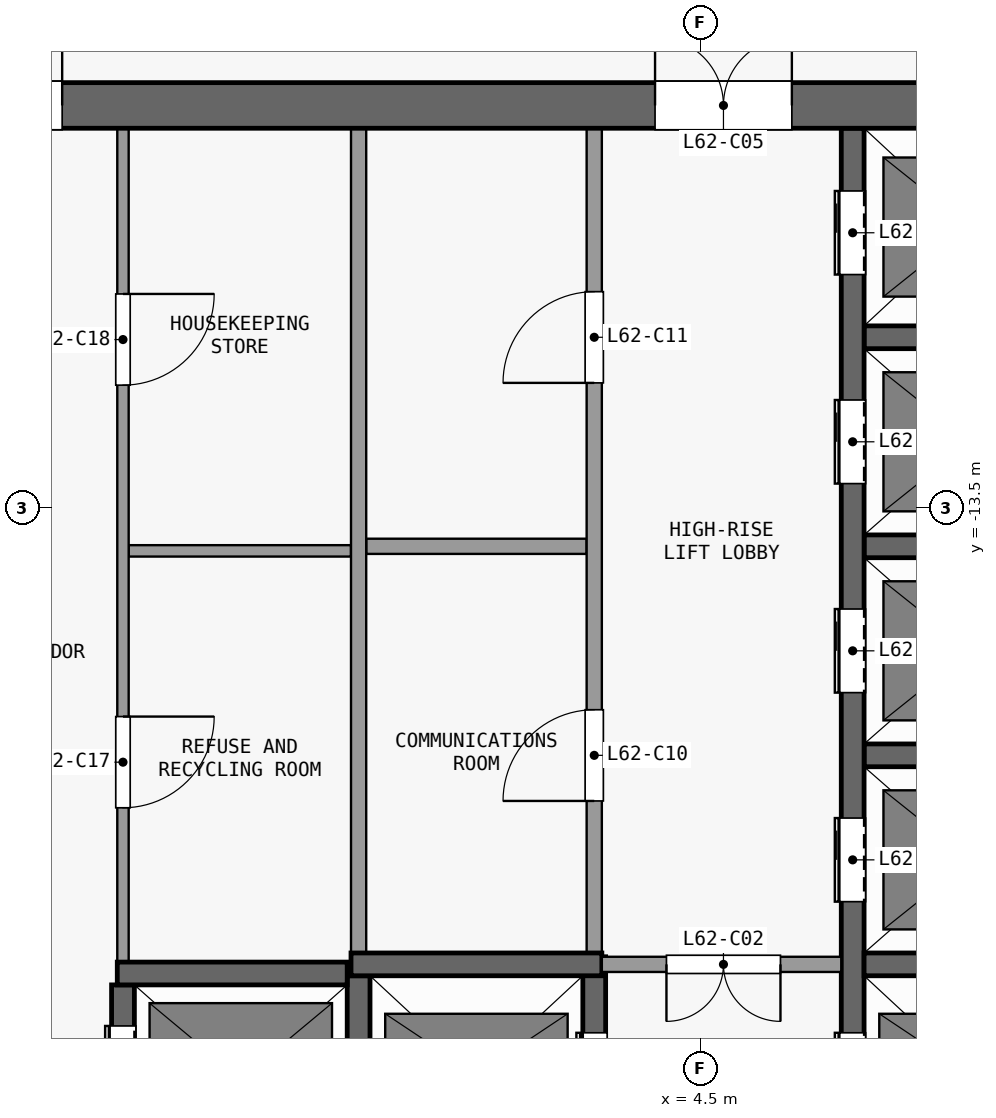
"""IFC4 building model, lengths in metres.
Left out: names, types, materials, properties, quantities, classifications, styles, units other than length and angle.
Written with IfcOpenShell. Run it as: python <this file> out.ifc"""

import sys

from ifc_helpers import new_model, si_unit, direction, frame, frame_2d, origin, place, context, subcontext, project, spatial, rectangle, extrude, element, fill, save


model = new_model("IFC4")
c1 = context("Model", 3, precision=1e-05, world=origin(), true_north=direction((0.0, 1.0)))
c2 = subcontext(c1, "Body", "Model", "MODEL_VIEW")
j1 = project(units=[si_unit("LENGTHUNIT", "METRE"), si_unit("PLANEANGLEUNIT", "RADIAN")], contexts=[c1])
p1 = place(None, origin())
s1 = spatial("IfcSite", under=j1, at=p1, CompositionType="ELEMENT")
p2 = place(p1, origin())
s2 = spatial("IfcBuilding", under=s1, at=p2, CompositionType="ELEMENT")
p3 = place(p2, frame((0.0, 0.0, 244.7)))
s3 = spatial("IfcBuildingStorey", under=s2, at=p3, CompositionType="ELEMENT", Elevation=244.7)
p4 = place(p3, frame((-13.2, -8.2, 0.0), z_axis=(0.0, 0.0, 1.0), x_axis=(1.0, 0.0, 0.0)))
e1 = element("IfcWall", 1, at=p4, inside=s3, PredefinedType="SHEAR", context=c2, shape_type="SweptSolid", body=[
    extrude(rectangle(XDim=26.4, YDim=0.6, at=frame_2d((13.2, 0.0))), origin(), (0.0, 0.0, 1.0), 3.15),
])
p5 = place(p4, frame((7.5, 0.0, 0.0)))
e2 = element("IfcOpeningElement", 2, at=p5, cuts=e1, PredefinedType="OPENING", context=c2, shape_type="SweptSolid", body=[
    extrude(rectangle(XDim=1.8, YDim=2.1, at=frame_2d((0.9, 1.05))), frame((0.0, 0.31, 0.0), z_axis=(0.0, -1.0, 0.0), x_axis=(1.0, 0.0, 0.0)), (0.0, 0.0, 1.0), 0.62),
])
p6 = place(p4, frame((17.1, 0.0, 0.0)))
e3 = element("IfcOpeningElement", 3, at=p6, cuts=e1, PredefinedType="OPENING", context=c2, shape_type="SweptSolid", body=[
    extrude(rectangle(XDim=1.8, YDim=2.1, at=frame_2d((0.9, 1.05))), frame((0.0, 0.31, 0.0), z_axis=(0.0, -1.0, 0.0), x_axis=(1.0, 0.0, 0.0)), (0.0, 0.0, 1.0), 0.62),
])
p7 = place(p4, frame((2.425, 0.0, 0.0)))
e4 = element("IfcOpeningElement", 4, at=p7, cuts=e1, PredefinedType="OPENING", context=c2, shape_type="SweptSolid", body=[
    extrude(rectangle(XDim=0.9, YDim=2.1, at=frame_2d((0.45, 1.05))), frame((0.0, 0.31, 0.0), z_axis=(0.0, -1.0, 0.0), x_axis=(1.0, 0.0, 0.0)), (0.0, 0.0, 1.0), 0.62),
])
p8 = place(p4, frame((23.075, 0.0, 0.0)))
e5 = element("IfcOpeningElement", 5, at=p8, cuts=e1, PredefinedType="OPENING", context=c2, shape_type="SweptSolid", body=[
    extrude(rectangle(XDim=0.9, YDim=2.1, at=frame_2d((0.45, 1.05))), frame((0.0, 0.31, 0.0), z_axis=(0.0, -1.0, 0.0), x_axis=(1.0, 0.0, 0.0)), (0.0, 0.0, 1.0), 0.62),
])
p9 = place(p3, frame((-3.175, -19.62, 0.0), z_axis=(0.0, 0.0, 1.0), x_axis=(1.0, 0.0, 0.0)))
e6 = element("IfcWall", 6, at=p9, inside=s3, PredefinedType="SHEAR", context=c2, shape_type="SweptSolid", body=[
    extrude(rectangle(XDim=3.025, YDim=0.3, at=frame_2d((1.513, 0.0))), origin(), (0.0, 0.0, 1.0), 3.15),
])
p10 = place(p3, frame((-0.1, -19.5, 0.0), z_axis=(0.0, 0.0, 1.0), x_axis=(1.0, 0.0, 0.0)))
e7 = element("IfcWall", 7, at=p10, inside=s3, PredefinedType="SHEAR", context=c2, shape_type="SweptSolid", body=[
    extrude(rectangle(XDim=3.3, YDim=0.3, at=frame_2d((1.65, 0.0))), origin(), (0.0, 0.0, 1.0), 3.15),
])
p11 = place(p3, frame((6.35, -19.5, 0.0), z_axis=(0.0, 0.0, 1.0), x_axis=(-1.0, 0.0, 0.0)))
e8 = element("IfcWall", 8, at=p11, inside=s3, PredefinedType="PARTITIONING", context=c2, shape_type="SweptSolid", body=[
    extrude(rectangle(XDim=3.15, YDim=0.2, at=frame_2d((1.575, 0.0))), origin(), (0.0, 0.0, 1.0), 3.15),
])
p12 = place(p11, frame((0.8, 0.0, 0.0)))
e9 = element("IfcOpeningElement", 9, at=p12, cuts=e8, PredefinedType="OPENING", context=c2, shape_type="SweptSolid", body=[
    extrude(rectangle(XDim=1.5, YDim=2.1, at=frame_2d((0.75, 1.05))), frame((0.0, 0.11, 0.0), z_axis=(0.0, -1.0, 0.0), x_axis=(1.0, 0.0, 0.0)), (0.0, 0.0, 1.0), 0.22),
])
for number, where, z_axis, x_axis in (
    (10, (6.65, -19.5, 0.0), (0.0, 0.0, 1.0), (1.0, 0.0, 0.0)),
    (11, (6.65, -16.75, 0.0), (0.0, 0.0, 1.0), (1.0, 0.0, 0.0)),
):
    element("IfcWall", number, at=place(p3, frame(where, z_axis=z_axis, x_axis=x_axis)), inside=s3, PredefinedType="SHEAR", context=c2, shape_type="SweptSolid", body=[
        extrude(rectangle(XDim=2.8, YDim=0.3, at=frame_2d((1.4, 0.0))), origin(), (0.0, 0.0, 1.0), 3.15),
    ])
p13 = place(p3, frame((-3.025, -14.06, 0.0), z_axis=(0.0, 0.0, 1.0), x_axis=(1.0, 0.0, 0.0)))
e12 = element("IfcWall", 12, at=p13, inside=s3, PredefinedType="PARTITIONING", context=c2, shape_type="SweptSolid", body=[
    extrude(rectangle(XDim=2.925, YDim=0.15, at=frame_2d((1.462, 0.0))), origin(), (0.0, 0.0, 1.0), 3.15),
])
p14 = place(p3, frame((0.1, -14.0, 0.0), z_axis=(0.0, 0.0, 1.0), x_axis=(1.0, 0.0, 0.0)))
e13 = element("IfcWall", 13, at=p14, inside=s3, PredefinedType="PARTITIONING", context=c2, shape_type="SweptSolid", body=[
    extrude(rectangle(XDim=2.9, YDim=0.2, at=frame_2d((1.45, 0.0))), origin(), (0.0, 0.0, 1.0), 3.15),
])
for number, where, z_axis, x_axis in (
    (14, (6.65, -14.0, 0.0), (0.0, 0.0, 1.0), (1.0, 0.0, 0.0)),
    (15, (6.65, -11.25, 0.0), (0.0, 0.0, 1.0), (1.0, 0.0, 0.0)),
):
    element("IfcWall", number, at=place(p3, frame(where, z_axis=z_axis, x_axis=x_axis)), inside=s3, PredefinedType="SHEAR", context=c2, shape_type="SweptSolid", body=[
        extrude(rectangle(XDim=2.8, YDim=0.3, at=frame_2d((1.4, 0.0))), origin(), (0.0, 0.0, 1.0), 3.15),
    ])
p15 = place(p3, frame((-3.1, -22.25, 0.0), z_axis=(0.0, 0.0, 1.0), x_axis=(0.0, 1.0, 0.0)))
e16 = element("IfcWall", 16, at=p15, inside=s3, PredefinedType="SHEAR", context=c2, shape_type="SweptSolid", body=[
    extrude(rectangle(XDim=2.48, YDim=0.3, at=frame_2d((1.24, 0.0))), origin(), (0.0, 0.0, 1.0), 3.15),
])
p16 = place(p15, frame((0.54, 0.0, 0.0)))
e17 = element("IfcOpeningElement", 17, at=p16, cuts=e16, PredefinedType="OPENING", context=c2, shape_type="SweptSolid", body=[
    extrude(rectangle(XDim=1.4, YDim=2.1, at=frame_2d((0.7, 1.05))), frame((0.0, 0.16, 0.0), z_axis=(0.0, -1.0, 0.0), x_axis=(1.0, 0.0, 0.0)), (0.0, 0.0, 1.0), 0.32),
])
p17 = place(p3, frame((-3.1, -8.5, 0.0), z_axis=(0.0, 0.0, 1.0), x_axis=(0.0, -1.0, 0.0)))
e18 = element("IfcWall", 18, at=p17, inside=s3, PredefinedType="PARTITIONING", context=c2, shape_type="SweptSolid", body=[
    extrude(rectangle(XDim=10.97, YDim=0.15, at=frame_2d((5.485, 0.0))), origin(), (0.0, 0.0, 1.0), 3.15),
])
p18 = place(p17, frame((7.74, 0.0, 0.0)))
e19 = element("IfcOpeningElement", 19, at=p18, cuts=e18, PredefinedType="OPENING", context=c2, shape_type="SweptSolid", body=[
    extrude(rectangle(XDim=1.2, YDim=2.1, at=frame_2d((0.6, 1.05))), frame((0.0, 0.085, 0.0), z_axis=(0.0, -1.0, 0.0), x_axis=(1.0, 0.0, 0.0)), (0.0, 0.0, 1.0), 0.17),
])
p19 = place(p17, frame((2.18, 0.0, 0.0)))
e20 = element("IfcOpeningElement", 20, at=p19, cuts=e18, PredefinedType="OPENING", context=c2, shape_type="SweptSolid", body=[
    extrude(rectangle(XDim=1.2, YDim=2.1, at=frame_2d((0.6, 1.05))), frame((0.0, 0.085, 0.0), z_axis=(0.0, -1.0, 0.0), x_axis=(1.0, 0.0, 0.0)), (0.0, 0.0, 1.0), 0.17),
])
p20 = place(p3, frame((0.0, -22.25, 0.0), z_axis=(0.0, 0.0, 1.0), x_axis=(0.0, 1.0, 0.0)))
e21 = element("IfcWall", 21, at=p20, inside=s3, PredefinedType="SHEAR", context=c2, shape_type="SweptSolid", body=[
    extrude(rectangle(XDim=2.6, YDim=0.3, at=frame_2d((1.3, 0.0))), origin(), (0.0, 0.0, 1.0), 3.15),
])
p21 = place(p3, frame((0.0, -19.35, 0.0), z_axis=(0.0, 0.0, 1.0), x_axis=(0.0, 1.0, 0.0)))
e22 = element("IfcWall", 22, at=p21, inside=s3, PredefinedType="PARTITIONING", context=c2, shape_type="SweptSolid", body=[
    extrude(rectangle(XDim=10.85, YDim=0.2, at=frame_2d((5.425, 0.0))), origin(), (0.0, 0.0, 1.0), 3.15),
])
p22 = place(p3, frame((3.1, -22.25, 0.0), z_axis=(0.0, 0.0, 1.0), x_axis=(0.0, 1.0, 0.0)))
e23 = element("IfcWall", 23, at=p22, inside=s3, PredefinedType="SHEAR", context=c2, shape_type="SweptSolid", body=[
    extrude(rectangle(XDim=2.85, YDim=0.3, at=frame_2d((1.425, 0.0))), origin(), (0.0, 0.0, 1.0), 3.15),
])
p23 = place(p22, frame((0.75, 0.0, 0.0)))
e24 = element("IfcOpeningElement", 24, at=p23, cuts=e23, PredefinedType="OPENING", context=c2, shape_type="SweptSolid", body=[
    extrude(rectangle(XDim=1.1, YDim=2.1, at=frame_2d((0.55, 1.05))), frame((0.0, 0.16, 0.0), z_axis=(0.0, -1.0, 0.0), x_axis=(1.0, 0.0, 0.0)), (0.0, 0.0, 1.0), 0.32),
])
p24 = place(p3, frame((3.1, -19.6, 0.0), z_axis=(0.0, 0.0, 1.0), x_axis=(0.0, 1.0, 0.0)))
e25 = element("IfcWall", 25, at=p24, inside=s3, PredefinedType="PARTITIONING", context=c2, shape_type="SweptSolid", body=[
    extrude(rectangle(XDim=11.1, YDim=0.2, at=frame_2d((5.55, 0.0))), origin(), (0.0, 0.0, 1.0), 3.15),
])
p25 = place(p24, frame((2.25, 0.0, 0.0)))
e26 = element("IfcOpeningElement", 26, at=p25, cuts=e25, PredefinedType="OPENING", context=c2, shape_type="SweptSolid", body=[
    extrude(rectangle(XDim=1.2, YDim=2.1, at=frame_2d((0.6, 1.05))), frame((0.0, 0.11, 0.0), z_axis=(0.0, -1.0, 0.0), x_axis=(1.0, 0.0, 0.0)), (0.0, 0.0, 1.0), 0.22),
])
p26 = place(p24, frame((7.75, 0.0, 0.0)))
e27 = element("IfcOpeningElement", 27, at=p26, cuts=e25, PredefinedType="OPENING", context=c2, shape_type="SweptSolid", body=[
    extrude(rectangle(XDim=1.2, YDim=2.1, at=frame_2d((0.6, 1.05))), frame((0.0, 0.11, 0.0), z_axis=(0.0, -1.0, 0.0), x_axis=(1.0, 0.0, 0.0)), (0.0, 0.0, 1.0), 0.22),
])
p27 = place(p3, frame((6.5, -22.55, 0.0), z_axis=(0.0, 0.0, 1.0), x_axis=(0.0, 1.0, 0.0)))
e28 = element("IfcWall", 28, at=p27, inside=s3, PredefinedType="SHEAR", context=c2, shape_type="SweptSolid", body=[
    extrude(rectangle(XDim=14.05, YDim=0.3, at=frame_2d((7.025, 0.0))), origin(), (0.0, 0.0, 1.0), 3.15),
])
p28 = place(p27, frame((1.05, 0.0, 0.0)))
e29 = element("IfcOpeningElement", 29, at=p28, cuts=e28, PredefinedType="OPENING", context=c2, shape_type="SweptSolid", body=[
    extrude(rectangle(XDim=1.1, YDim=2.1, at=frame_2d((0.55, 1.05))), frame((0.0, 0.16, 0.0), z_axis=(0.0, -1.0, 0.0), x_axis=(1.0, 0.0, 0.0)), (0.0, 0.0, 1.0), 0.32),
])
p29 = place(p27, frame((3.875, 0.0, 0.0)))
e30 = element("IfcOpeningElement", 30, at=p29, cuts=e28, PredefinedType="OPENING", context=c2, shape_type="SweptSolid", body=[
    extrude(rectangle(XDim=1.1, YDim=2.1, at=frame_2d((0.55, 1.05))), frame((0.0, 0.16, 0.0), z_axis=(0.0, -1.0, 0.0), x_axis=(1.0, 0.0, 0.0)), (0.0, 0.0, 1.0), 0.32),
])
p30 = place(p27, frame((6.625, 0.0, 0.0)))
e31 = element("IfcOpeningElement", 31, at=p30, cuts=e28, PredefinedType="OPENING", context=c2, shape_type="SweptSolid", body=[
    extrude(rectangle(XDim=1.1, YDim=2.1, at=frame_2d((0.55, 1.05))), frame((0.0, 0.16, 0.0), z_axis=(0.0, -1.0, 0.0), x_axis=(1.0, 0.0, 0.0)), (0.0, 0.0, 1.0), 0.32),
])
p31 = place(p27, frame((9.375, 0.0, 0.0)))
e32 = element("IfcOpeningElement", 32, at=p31, cuts=e28, PredefinedType="OPENING", context=c2, shape_type="SweptSolid", body=[
    extrude(rectangle(XDim=1.1, YDim=2.1, at=frame_2d((0.55, 1.05))), frame((0.0, 0.16, 0.0), z_axis=(0.0, -1.0, 0.0), x_axis=(1.0, 0.0, 0.0)), (0.0, 0.0, 1.0), 0.32),
])
p32 = place(p27, frame((12.125, 0.0, 0.0)))
e33 = element("IfcOpeningElement", 33, at=p32, cuts=e28, PredefinedType="OPENING", context=c2, shape_type="SweptSolid", body=[
    extrude(rectangle(XDim=1.1, YDim=2.1, at=frame_2d((0.55, 1.05))), frame((0.0, 0.16, 0.0), z_axis=(0.0, -1.0, 0.0), x_axis=(1.0, 0.0, 0.0)), (0.0, 0.0, 1.0), 0.32),
])
p33 = place(p23, origin())
e34 = element("IfcDoor", 34, at=p33, inside=s3, OperationType="DOUBLE_DOOR_SLIDING", PredefinedType="DOOR", context=c2, shape_type="SweptSolid", body=[
    extrude(rectangle(XDim=1.1, YDim=2.1, at=frame_2d((0.55, 1.05))), frame((0.0, 0.025, 0.0), z_axis=(0.0, -1.0, 0.0), x_axis=(1.0, 0.0, 0.0)), (0.0, 0.0, 1.0), 0.05),
])
fill(e24, e34)
p34 = place(p28, origin())
e35 = element("IfcDoor", 35, at=p34, inside=s3, OperationType="DOUBLE_DOOR_SLIDING", PredefinedType="DOOR", context=c2, shape_type="SweptSolid", body=[
    extrude(rectangle(XDim=1.1, YDim=2.1, at=frame_2d((0.55, 1.05))), frame((0.0, 0.025, 0.0), z_axis=(0.0, -1.0, 0.0), x_axis=(1.0, 0.0, 0.0)), (0.0, 0.0, 1.0), 0.05),
])
fill(e29, e35)
p35 = place(p29, origin())
e36 = element("IfcDoor", 36, at=p35, inside=s3, OperationType="DOUBLE_DOOR_SLIDING", PredefinedType="DOOR", context=c2, shape_type="SweptSolid", body=[
    extrude(rectangle(XDim=1.1, YDim=2.1, at=frame_2d((0.55, 1.05))), frame((0.0, 0.025, 0.0), z_axis=(0.0, -1.0, 0.0), x_axis=(1.0, 0.0, 0.0)), (0.0, 0.0, 1.0), 0.05),
])
fill(e30, e36)
p36 = place(p30, origin())
e37 = element("IfcDoor", 37, at=p36, inside=s3, OperationType="DOUBLE_DOOR_SLIDING", PredefinedType="DOOR", context=c2, shape_type="SweptSolid", body=[
    extrude(rectangle(XDim=1.1, YDim=2.1, at=frame_2d((0.55, 1.05))), frame((0.0, 0.025, 0.0), z_axis=(0.0, -1.0, 0.0), x_axis=(1.0, 0.0, 0.0)), (0.0, 0.0, 1.0), 0.05),
])
fill(e31, e37)
p37 = place(p31, origin())
e38 = element("IfcDoor", 38, at=p37, inside=s3, OperationType="DOUBLE_DOOR_SLIDING", PredefinedType="DOOR", context=c2, shape_type="SweptSolid", body=[
    extrude(rectangle(XDim=1.1, YDim=2.1, at=frame_2d((0.55, 1.05))), frame((0.0, 0.025, 0.0), z_axis=(0.0, -1.0, 0.0), x_axis=(1.0, 0.0, 0.0)), (0.0, 0.0, 1.0), 0.05),
])
fill(e32, e38)
p38 = place(p32, origin())
e39 = element("IfcDoor", 39, at=p38, inside=s3, OperationType="DOUBLE_DOOR_SLIDING", PredefinedType="DOOR", context=c2, shape_type="SweptSolid", body=[
    extrude(rectangle(XDim=1.1, YDim=2.1, at=frame_2d((0.55, 1.05))), frame((0.0, 0.025, 0.0), z_axis=(0.0, -1.0, 0.0), x_axis=(1.0, 0.0, 0.0)), (0.0, 0.0, 1.0), 0.05),
])
fill(e33, e39)
p39 = place(p16, origin())
e40 = element("IfcDoor", 40, at=p39, inside=s3, OperationType="DOUBLE_DOOR_SLIDING", PredefinedType="DOOR", context=c2, shape_type="SweptSolid", body=[
    extrude(rectangle(XDim=1.4, YDim=2.1, at=frame_2d((0.7, 1.05))), frame((0.0, 0.025, 0.0), z_axis=(0.0, -1.0, 0.0), x_axis=(1.0, 0.0, 0.0)), (0.0, 0.0, 1.0), 0.05),
])
fill(e17, e40)
p40 = place(p12, origin())
e41 = element("IfcDoor", 41, at=p40, inside=s3, OperationType="DOUBLE_DOOR_SINGLE_SWING", PredefinedType="DOOR", context=c2, shape_type="SweptSolid", body=[
    extrude(rectangle(XDim=1.5, YDim=2.1, at=frame_2d((0.75, 1.05))), frame((0.0, 0.025, 0.0), z_axis=(0.0, -1.0, 0.0), x_axis=(1.0, 0.0, 0.0)), (0.0, 0.0, 1.0), 0.05),
])
fill(e9, e41)
p41 = place(p5, origin())
e42 = element("IfcDoor", 42, at=p41, inside=s3, OperationType="DOUBLE_DOOR_SINGLE_SWING", PredefinedType="DOOR", context=c2, shape_type="SweptSolid", body=[
    extrude(rectangle(XDim=1.8, YDim=2.1, at=frame_2d((0.9, 1.05))), frame((0.0, 0.025, 0.0), z_axis=(0.0, -1.0, 0.0), x_axis=(1.0, 0.0, 0.0)), (0.0, 0.0, 1.0), 0.05),
])
fill(e2, e42)
p42 = place(p6, origin())
e43 = element("IfcDoor", 43, at=p42, inside=s3, OperationType="DOUBLE_DOOR_SINGLE_SWING", PredefinedType="DOOR", context=c2, shape_type="SweptSolid", body=[
    extrude(rectangle(XDim=1.8, YDim=2.1, at=frame_2d((0.9, 1.05))), frame((0.0, 0.025, 0.0), z_axis=(0.0, -1.0, 0.0), x_axis=(1.0, 0.0, 0.0)), (0.0, 0.0, 1.0), 0.05),
])
fill(e3, e43)
p43 = place(p25, origin())
e44 = element("IfcDoor", 44, at=p43, inside=s3, OperationType="SINGLE_SWING_LEFT", PredefinedType="DOOR", context=c2, shape_type="SweptSolid", body=[
    extrude(rectangle(XDim=1.2, YDim=2.1, at=frame_2d((0.6, 1.05))), frame((0.0, 0.025, 0.0), z_axis=(0.0, -1.0, 0.0), x_axis=(1.0, 0.0, 0.0)), (0.0, 0.0, 1.0), 0.05),
])
fill(e26, e44)
p44 = place(p26, origin())
e45 = element("IfcDoor", 45, at=p44, inside=s3, OperationType="SINGLE_SWING_LEFT", PredefinedType="DOOR", context=c2, shape_type="SweptSolid", body=[
    extrude(rectangle(XDim=1.2, YDim=2.1, at=frame_2d((0.6, 1.05))), frame((0.0, 0.025, 0.0), z_axis=(0.0, -1.0, 0.0), x_axis=(1.0, 0.0, 0.0)), (0.0, 0.0, 1.0), 0.05),
])
fill(e27, e45)
p45 = place(p18, origin())
e46 = element("IfcDoor", 46, at=p45, inside=s3, OperationType="SINGLE_SWING_LEFT", PredefinedType="DOOR", context=c2, shape_type="SweptSolid", body=[
    extrude(rectangle(XDim=1.2, YDim=2.1, at=frame_2d((0.6, 1.05))), frame((0.0, 0.025, 0.0), z_axis=(0.0, -1.0, 0.0), x_axis=(1.0, 0.0, 0.0)), (0.0, 0.0, 1.0), 0.05),
])
fill(e19, e46)
p46 = place(p19, origin())
e47 = element("IfcDoor", 47, at=p46, inside=s3, OperationType="SINGLE_SWING_LEFT", PredefinedType="DOOR", context=c2, shape_type="SweptSolid", body=[
    extrude(rectangle(XDim=1.2, YDim=2.1, at=frame_2d((0.6, 1.05))), frame((0.0, 0.025, 0.0), z_axis=(0.0, -1.0, 0.0), x_axis=(1.0, 0.0, 0.0)), (0.0, 0.0, 1.0), 0.05),
])
fill(e20, e47)
save(model, sys.argv[1])
